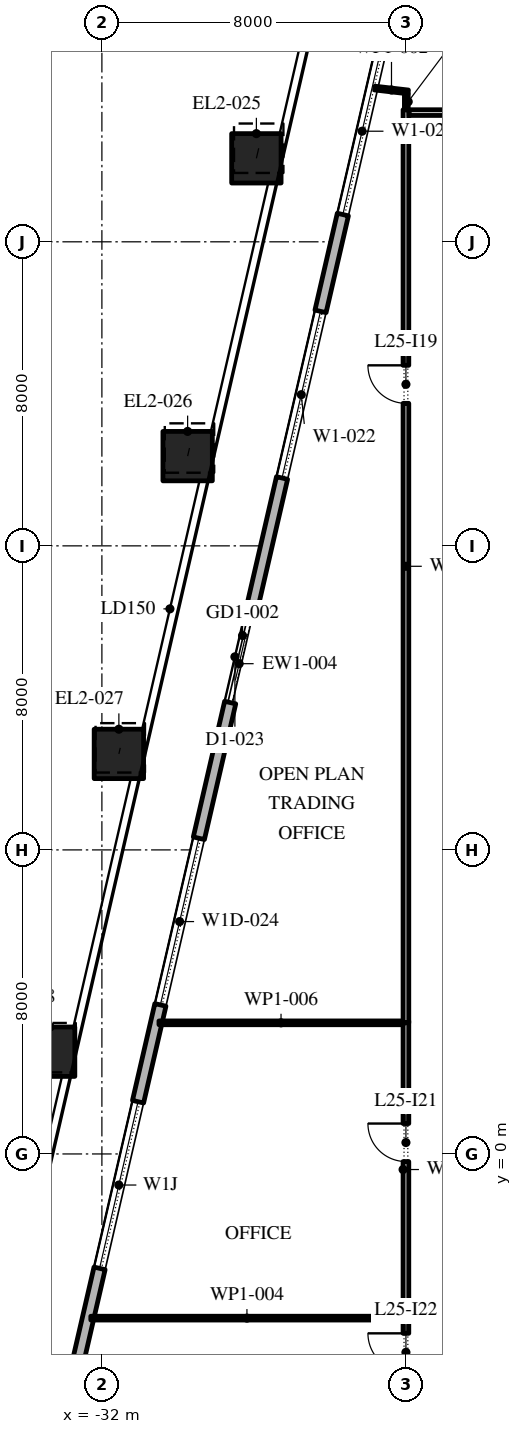
"""IFC4 building model, lengths in metres.
Left out: names, types, materials, properties, quantities, classifications, styles, units other than length and angle.
Written with IfcOpenShell. Run it as: python <this file> out.ifc"""

import sys

from ifc_helpers import new_model, si_unit, direction, frame, frame_2d, origin, origin_2d, place, context, subcontext, project, spatial, rectangle, extrude, element, fill, save


model = new_model("IFC4")
c1 = context("Model", 3, precision=1e-05, world=origin(), true_north=direction((0.0, 1.0)))
c2 = subcontext(c1, "Body", "Model", "MODEL_VIEW")
j1 = project(units=[si_unit("LENGTHUNIT", "METRE"), si_unit("PLANEANGLEUNIT", "RADIAN")], contexts=[c1])
p1 = place(None, origin())
s1 = spatial("IfcSite", under=j1, at=p1, CompositionType="ELEMENT")
p2 = place(p1, origin())
s2 = spatial("IfcBuilding", under=s1, at=p2, CompositionType="ELEMENT")
p3 = place(p2, frame((0.0, 0.0, 118.2)))
s3 = spatial("IfcBuildingStorey", under=s2, at=p3, CompositionType="ELEMENT", Elevation=118.2)
p4 = place(p3, frame((-27.935, 26.197, 0.0), z_axis=(0.014617836866, 0.063111930596, 0.997899395261), x_axis=(-0.974209784844, 0.225644178107, 0.0)))
e1 = element("IfcColumn", 1, at=p4, inside=s3, PredefinedType="COLUMN", context=c2, shape_type="SweptSolid", body=[
    extrude(rectangle(XDim=1.3, YDim=1.3, at=origin_2d()), origin(), (0.0, 0.0, 1.0), 4.209),
])
p5 = place(p3, frame((-29.744, 18.361, 0.0), z_axis=(0.011668267153, 0.050562490995, 0.998652735462), x_axis=(-0.974391195695, 0.224859506699, 0.0)))
e2 = element("IfcColumn", 2, at=p5, inside=s3, PredefinedType="COLUMN", context=c2, shape_type="SweptSolid", body=[
    extrude(rectangle(XDim=1.3, YDim=1.3, at=origin_2d()), origin(), (0.0, 0.0, 1.0), 4.206),
])
p6 = place(p3, frame((-31.553, 10.526, 0.0), z_axis=(0.00871280379, 0.037929739166, 0.999242424008), x_axis=(-0.974617095667, 0.223878352757, 0.0)))
e3 = element("IfcColumn", 3, at=p6, inside=s3, PredefinedType="COLUMN", context=c2, shape_type="SweptSolid", body=[
    extrude(rectangle(XDim=1.3, YDim=1.3, at=origin_2d()), origin(), (0.0, 0.0, 1.0), 4.203),
])
p7 = place(p3, frame((-33.362, 2.69, 0.0), z_axis=(0.005869083212, 0.025335844359, 0.999661767226), x_axis=(-0.974202561131, 0.225675363932, 0.0)))
e4 = element("IfcColumn", 4, at=p7, inside=s3, PredefinedType="COLUMN", context=c2, shape_type="SweptSolid", body=[
    extrude(rectangle(XDim=1.3, YDim=1.3, at=origin_2d()), origin(), (0.0, 0.0, 1.0), 4.201),
])
p8 = place(p3, frame((-22.82, 37.016, 0.0), z_axis=(0.0, 0.0, 1.0), x_axis=(-0.224953880882, -0.974369412223, 0.0)))
e5 = element("IfcWall", 5, at=p8, inside=s3, PredefinedType="STANDARD", context=c2, shape_type="SweptSolid", body=[
    extrude(rectangle(XDim=49.5, YDim=0.3, at=frame_2d((24.75, 0.0))), origin(), (0.0, 0.0, 1.0), 4.0),
])
p9 = place(p8, frame((1.157, 0.0, 0.45)))
e6 = element("IfcOpeningElement", 6, at=p9, cuts=e5, PredefinedType="OPENING", context=c2, shape_type="SweptSolid", body=[
    extrude(rectangle(XDim=4.5, YDim=3.05, at=frame_2d((2.25, 1.525))), frame((0.0, 0.16, 0.0), z_axis=(0.0, -1.0, 0.0), x_axis=(1.0, 0.0, 0.0)), (0.0, 0.0, 1.0), 0.32),
])
p10 = place(p8, frame((8.121, 0.0, 0.45)))
e7 = element("IfcOpeningElement", 7, at=p10, cuts=e5, PredefinedType="OPENING", context=c2, shape_type="SweptSolid", body=[
    extrude(rectangle(XDim=4.5, YDim=3.05, at=frame_2d((2.25, 1.525))), frame((0.0, 0.16, 0.0), z_axis=(0.0, -1.0, 0.0), x_axis=(1.0, 0.0, 0.0)), (0.0, 0.0, 1.0), 0.32),
])
p11 = place(p8, frame((15.236, 0.0, 0.45)))
e8 = element("IfcOpeningElement", 8, at=p11, cuts=e5, PredefinedType="OPENING", context=c2, shape_type="SweptSolid", body=[
    extrude(rectangle(XDim=4.5, YDim=3.05, at=frame_2d((2.25, 1.525))), frame((0.0, 0.16, 0.0), z_axis=(0.0, -1.0, 0.0), x_axis=(1.0, 0.0, 0.0)), (0.0, 0.0, 1.0), 0.32),
])
p12 = place(p8, frame((23.4, 0.0, 0.0)))
e9 = element("IfcOpeningElement", 9, at=p12, cuts=e5, PredefinedType="OPENING", context=c2, shape_type="SweptSolid", body=[
    extrude(rectangle(XDim=2.4, YDim=3.5, at=frame_2d((1.2, 1.75))), frame((0.0, 0.16, 0.0), z_axis=(0.0, -1.0, 0.0), x_axis=(1.0, 0.0, 0.0)), (0.0, 0.0, 1.0), 0.32),
])
p13 = place(p8, frame((29.464, 0.0, 0.45)))
e10 = element("IfcOpeningElement", 10, at=p13, cuts=e5, PredefinedType="OPENING", context=c2, shape_type="SweptSolid", body=[
    extrude(rectangle(XDim=4.5, YDim=2.875, at=frame_2d((2.25, 1.438))), frame((0.0, 0.16, 0.0), z_axis=(0.0, -1.0, 0.0), x_axis=(1.0, 0.0, 0.0)), (0.0, 0.0, 1.0), 0.32),
])
p14 = place(p8, frame((36.579, 0.0, 0.45)))
e11 = element("IfcOpeningElement", 11, at=p14, cuts=e5, PredefinedType="OPENING", context=c2, shape_type="SweptSolid", body=[
    extrude(rectangle(XDim=4.5, YDim=2.675, at=frame_2d((2.25, 1.337))), frame((0.0, 0.16, 0.0), z_axis=(0.0, -1.0, 0.0), x_axis=(1.0, 0.0, 0.0)), (0.0, 0.0, 1.0), 0.32),
])
p15 = place(p8, frame((43.693, 0.0, 0.45)))
e12 = element("IfcOpeningElement", 12, at=p15, cuts=e5, PredefinedType="OPENING", context=c2, shape_type="SweptSolid", body=[
    extrude(rectangle(XDim=4.5, YDim=3.05, at=frame_2d((2.25, 1.525))), frame((0.0, 0.16, 0.0), z_axis=(0.0, -1.0, 0.0), x_axis=(1.0, 0.0, 0.0)), (0.0, 0.0, 1.0), 0.32),
])
p16 = place(p3, frame((-24.82, 28.045, 0.0), z_axis=(0.0, 0.0, 1.0), x_axis=(0.993501545499, -0.113818623659, 0.0)))
e13 = element("IfcWall", 13, at=p16, inside=s3, PredefinedType="PARTITIONING", context=c2, shape_type="SweptSolid", body=[
    extrude(rectangle(XDim=0.886, YDim=0.1, at=frame_2d((0.443, 0.0))), origin(), (0.0, 0.0, 1.0), 4.0),
])
p17 = place(p3, frame((-24.0, -7.775, 0.0), z_axis=(0.0, 0.0, 1.0), x_axis=(0.0, 1.0, 0.0)))
e14 = element("IfcWall", 14, at=p17, inside=s3, PredefinedType="PARTITIONING", context=c2, shape_type="SweptSolid", body=[
    extrude(rectangle(XDim=3.455, YDim=0.15, at=frame_2d((1.728, 0.0))), origin(), (0.0, 0.0, 1.0), 4.0),
])
p18 = place(p17, frame((2.055, 0.0, 0.0)))
e15 = element("IfcOpeningElement", 15, at=p18, cuts=e14, PredefinedType="OPENING", context=c2, shape_type="SweptSolid", body=[
    extrude(rectangle(XDim=1.0, YDim=2.1, at=frame_2d((0.5, 1.05))), frame((0.0, 0.085, 0.0), z_axis=(0.0, -1.0, 0.0), x_axis=(1.0, 0.0, 0.0)), (0.0, 0.0, 1.0), 0.17),
])
p19 = place(p3, frame((-24.075, -4.32, 0.0), z_axis=(0.0, 0.0, 1.0), x_axis=(-1.0, 0.0, 0.0)))
e16 = element("IfcWall", 16, at=p19, inside=s3, PredefinedType="PARTITIONING", context=c2, shape_type="SweptSolid", body=[
    extrude(rectangle(XDim=8.217, YDim=0.1, at=frame_2d((4.108, 0.0))), origin(), (0.0, 0.0, 1.0), 4.0),
])
p20 = place(p3, frame((-24.0, -4.32, 0.0), z_axis=(0.0, 0.0, 1.0), x_axis=(0.0, 1.0, 0.0)))
e17 = element("IfcWall", 17, at=p20, inside=s3, PredefinedType="PARTITIONING", context=c2, shape_type="SweptSolid", body=[
    extrude(rectangle(XDim=7.82, YDim=0.15, at=frame_2d((3.91, 0.0))), origin(), (0.0, 0.0, 1.0), 4.0),
])
p21 = place(p20, frame((4.12, 0.0, 0.0)))
e18 = element("IfcOpeningElement", 18, at=p21, cuts=e17, PredefinedType="OPENING", context=c2, shape_type="SweptSolid", body=[
    extrude(rectangle(XDim=1.0, YDim=2.1, at=frame_2d((0.5, 1.05))), frame((0.0, 0.085, 0.0), z_axis=(0.0, -1.0, 0.0), x_axis=(1.0, 0.0, 0.0)), (0.0, 0.0, 1.0), 0.17),
])
p22 = place(p3, frame((-24.075, 3.45, 0.0), z_axis=(0.0, 0.0, 1.0), x_axis=(-1.0, 0.0, 0.0)))
e19 = element("IfcWall", 19, at=p22, inside=s3, PredefinedType="PARTITIONING", context=c2, shape_type="SweptSolid", body=[
    extrude(rectangle(XDim=6.423, YDim=0.1, at=frame_2d((3.211, 0.0))), origin(), (0.0, 0.0, 1.0), 4.0),
])
p23 = place(p3, frame((-24.0, 3.45, 0.0), z_axis=(0.0, 0.0, 1.0), x_axis=(0.0, 1.0, 0.0)))
e20 = element("IfcWall", 20, at=p23, inside=s3, PredefinedType="PARTITIONING", context=c2, shape_type="SweptSolid", body=[
    extrude(rectangle(XDim=24.025, YDim=0.15, at=frame_2d((12.013, 0.0))), origin(), (0.0, 0.0, 1.0), 4.0),
])
p24 = place(p23, frame((16.3, 0.0, 0.0)))
e21 = element("IfcOpeningElement", 21, at=p24, cuts=e20, PredefinedType="OPENING", context=c2, shape_type="SweptSolid", body=[
    extrude(rectangle(XDim=1.0, YDim=2.1, at=frame_2d((0.5, 1.05))), frame((0.0, 0.085, 0.0), z_axis=(0.0, -1.0, 0.0), x_axis=(1.0, 0.0, 0.0)), (0.0, 0.0, 1.0), 0.17),
])
p25 = place(p3, frame((-23.99, 27.475, 0.0), z_axis=(0.0, 0.0, 1.0), x_axis=(0.0, 1.0, 0.0)))
e22 = element("IfcWall", 22, at=p25, inside=s3, PredefinedType="PARTITIONING", context=c2, shape_type="SweptSolid", body=[
    extrude(rectangle(XDim=0.425, YDim=0.1, at=frame_2d((0.212, 0.0))), origin(), (0.0, 0.0, 1.0), 4.0),
])
p26 = place(p3, frame((-23.915, 27.4, 0.0), z_axis=(0.0, 0.0, 1.0), x_axis=(1.0, 0.0, 0.0)))
e23 = element("IfcWall", 23, at=p26, inside=s3, PredefinedType="PARTITIONING", context=c2, shape_type="SweptSolid", body=[
    extrude(rectangle(XDim=9.295, YDim=0.15, at=frame_2d((4.647, 0.0))), origin(), (0.0, 0.0, 1.0), 4.0),
])
p27 = place(p26, frame((3.095, 0.0, 0.0)))
e24 = element("IfcOpeningElement", 24, at=p27, cuts=e23, PredefinedType="OPENING", context=c2, shape_type="SweptSolid", body=[
    extrude(rectangle(XDim=1.0, YDim=2.1, at=frame_2d((0.5, 1.05))), frame((0.0, 0.085, 0.0), z_axis=(0.0, -1.0, 0.0), x_axis=(1.0, 0.0, 0.0)), (0.0, 0.0, 1.0), 0.17),
])
p28 = place(p10, origin())
e25 = element("IfcWindow", 25, at=p28, inside=s3, PartitioningType="DOUBLE_PANEL_VERTICAL", PredefinedType="WINDOW", context=c2, shape_type="SweptSolid", body=[
    extrude(rectangle(XDim=4.5, YDim=3.05, at=frame_2d((2.25, 1.525))), frame((0.0, 0.03, 0.0), z_axis=(0.0, -1.0, 0.0), x_axis=(1.0, 0.0, 0.0)), (0.0, 0.0, 1.0), 0.06),
])
fill(e7, e25)
p29 = place(p11, origin())
e26 = element("IfcWindow", 26, at=p29, inside=s3, PartitioningType="DOUBLE_PANEL_VERTICAL", PredefinedType="WINDOW", context=c2, shape_type="SweptSolid", body=[
    extrude(rectangle(XDim=4.5, YDim=3.05, at=frame_2d((2.25, 1.525))), frame((0.0, 0.03, 0.0), z_axis=(0.0, -1.0, 0.0), x_axis=(1.0, 0.0, 0.0)), (0.0, 0.0, 1.0), 0.06),
])
fill(e8, e26)
p30 = place(p12, origin())
e27 = element("IfcDoor", 27, at=p30, inside=s3, OperationType="DOUBLE_DOOR_SLIDING", PredefinedType="DOOR", context=c2, shape_type="SweptSolid", body=[
    extrude(rectangle(XDim=2.4, YDim=3.5, at=frame_2d((1.2, 1.75))), frame((0.0, 0.025, 0.0), z_axis=(0.0, -1.0, 0.0), x_axis=(1.0, 0.0, 0.0)), (0.0, 0.0, 1.0), 0.05),
])
fill(e9, e27)
p31 = place(p13, origin())
e28 = element("IfcWindow", 28, at=p31, inside=s3, PartitioningType="DOUBLE_PANEL_VERTICAL", PredefinedType="WINDOW", context=c2, shape_type="SweptSolid", body=[
    extrude(rectangle(XDim=4.5, YDim=2.875, at=frame_2d((2.25, 1.438))), frame((0.0, 0.03, 0.0), z_axis=(0.0, -1.0, 0.0), x_axis=(1.0, 0.0, 0.0)), (0.0, 0.0, 1.0), 0.06),
])
fill(e10, e28)
p32 = place(p14, origin())
e29 = element("IfcWindow", 29, at=p32, inside=s3, PartitioningType="DOUBLE_PANEL_VERTICAL", PredefinedType="WINDOW", context=c2, shape_type="SweptSolid", body=[
    extrude(rectangle(XDim=4.5, YDim=2.675, at=frame_2d((2.25, 1.337))), frame((0.0, 0.03, 0.0), z_axis=(0.0, -1.0, 0.0), x_axis=(1.0, 0.0, 0.0)), (0.0, 0.0, 1.0), 0.06),
])
fill(e11, e29)
p33 = place(p24, origin())
e30 = element("IfcDoor", 30, at=p33, inside=s3, OperationType="SINGLE_SWING_LEFT", PredefinedType="DOOR", context=c2, shape_type="SweptSolid", body=[
    extrude(rectangle(XDim=1.0, YDim=2.1, at=frame_2d((0.5, 1.05))), frame((0.0, 0.025, 0.0), z_axis=(0.0, -1.0, 0.0), x_axis=(1.0, 0.0, 0.0)), (0.0, 0.0, 1.0), 0.05),
])
fill(e21, e30)
p34 = place(p21, origin())
e31 = element("IfcDoor", 31, at=p34, inside=s3, OperationType="SINGLE_SWING_LEFT", PredefinedType="DOOR", context=c2, shape_type="SweptSolid", body=[
    extrude(rectangle(XDim=1.0, YDim=2.1, at=frame_2d((0.5, 1.05))), frame((0.0, 0.025, 0.0), z_axis=(0.0, -1.0, 0.0), x_axis=(1.0, 0.0, 0.0)), (0.0, 0.0, 1.0), 0.05),
])
fill(e18, e31)
p35 = place(p18, origin())
e32 = element("IfcDoor", 32, at=p35, inside=s3, OperationType="SINGLE_SWING_LEFT", PredefinedType="DOOR", context=c2, shape_type="SweptSolid", body=[
    extrude(rectangle(XDim=1.0, YDim=2.1, at=frame_2d((0.5, 1.05))), frame((0.0, 0.025, 0.0), z_axis=(0.0, -1.0, 0.0), x_axis=(1.0, 0.0, 0.0)), (0.0, 0.0, 1.0), 0.05),
])
fill(e15, e32)
save(model, sys.argv[1])
